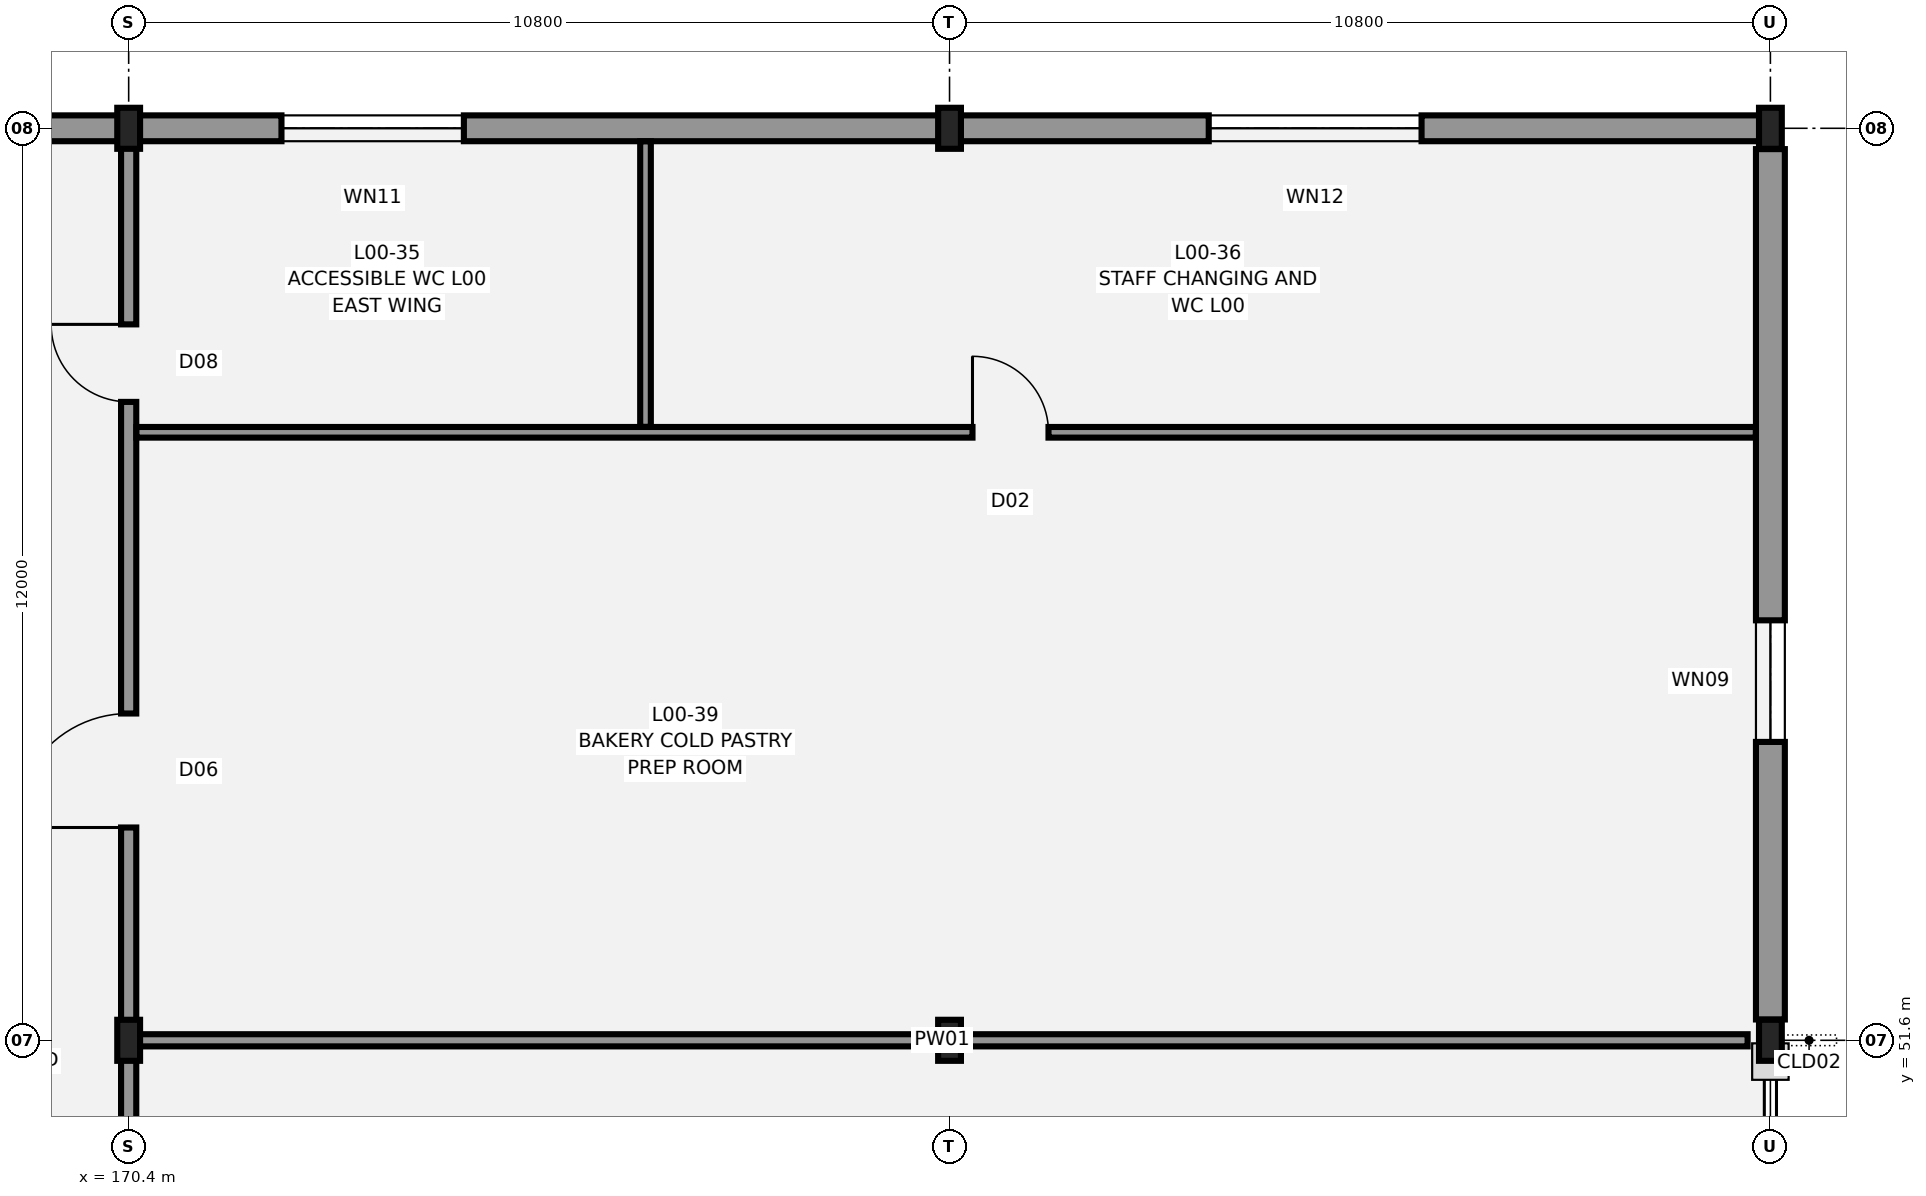
"""IFC4 building model, lengths in metres.
Left out: names, types, materials, properties, quantities, classifications, styles, units other than length and angle.
Written with IfcOpenShell. Run it as: python <this file> out.ifc"""

import sys

from ifc_helpers import new_model, si_unit, direction, frame, frame_2d, origin, origin_2d, place, context, subcontext, project, spatial, rectangle, i_section, extrude, element, fill, save


model = new_model("IFC4")
c1 = context("Model", 3, precision=1e-05, world=origin(), true_north=direction((0.0, 1.0)))
c2 = subcontext(c1, "Body", "Model", "MODEL_VIEW")
j1 = project(units=[si_unit("LENGTHUNIT", "METRE"), si_unit("PLANEANGLEUNIT", "RADIAN")], contexts=[c1])
p1 = place(None, origin())
s1 = spatial("IfcSite", under=j1, at=p1, CompositionType="ELEMENT")
p2 = place(p1, origin())
s2 = spatial("IfcBuilding", under=s1, at=p2, CompositionType="ELEMENT")
p3 = place(p2, origin())
s3 = spatial("IfcBuildingStorey", under=s2, at=p3, CompositionType="ELEMENT", Elevation=0.0)
for number, where, z_axis, x_axis in (
    (1, (170.4, 51.6, 0.0), (0.0, 0.0, 1.0), (1.0, 0.0, 0.0)),
    (2, (170.4, 63.6, 0.0), (0.0, 0.0, 1.0), (1.0, 0.0, 0.0)),
    (3, (181.2, 51.6, 0.0), (0.0, 0.0, 1.0), (1.0, 0.0, 0.0)),
    (4, (181.2, 63.6, 0.0), (0.0, 0.0, 1.0), (1.0, 0.0, 0.0)),
    (5, (192.0, 51.6, 0.0), (0.0, 0.0, 1.0), (1.0, 0.0, 0.0)),
    (6, (192.0, 63.6, 0.0), (0.0, 0.0, 1.0), (1.0, 0.0, 0.0)),
):
    element("IfcColumn", number, at=place(p3, frame(where, z_axis=z_axis, x_axis=x_axis)), inside=s3, PredefinedType="COLUMN", context=c2, shape_type="SweptSolid", body=[
        extrude(i_section(OverallWidth=0.3, OverallDepth=0.54, WebThickness=0.012, FlangeThickness=0.024, FilletRadius=0.027, at=origin_2d()), origin(), (0.0, 0.0, 1.0), 5.4),
    ])
p4 = place(p3, frame((192.0, 63.326, 0.0), z_axis=(0.0, 0.0, 1.0), x_axis=(0.0, -1.0, 0.0)))
e7 = element("IfcWall", 7, at=p4, inside=s3, PredefinedType="STANDARD", context=c2, shape_type="SweptSolid", body=[
    extrude(rectangle(XDim=11.452, YDim=0.38, at=frame_2d((5.726, 0.0))), origin(), (0.0, 0.0, 1.0), 4.765),
])
p5 = place(p4, frame((6.2, 0.0, 0.8)))
e8 = element("IfcOpeningElement", 8, at=p5, cuts=e7, PredefinedType="OPENING", context=c2, shape_type="SweptSolid", body=[
    extrude(rectangle(XDim=1.6, YDim=2.0, at=frame_2d((0.8, 1.0))), frame((0.0, 0.2, 0.0), z_axis=(0.0, -1.0, 0.0), x_axis=(1.0, 0.0, 0.0)), (0.0, 0.0, 1.0), 0.4),
])
p6 = place(p3, frame((159.61, 63.6, 0.0), z_axis=(0.0, 0.0, 1.0), x_axis=(1.0, 0.0, 0.0)))
e9 = element("IfcWall", 9, at=p6, inside=s3, PredefinedType="STANDARD", context=c2, shape_type="SweptSolid", body=[
    extrude(rectangle(XDim=10.779, YDim=0.34, at=frame_2d((5.39, 0.0))), origin(), (0.0, 0.0, 1.0), 4.665),
])
p7 = place(p6, frame((3.6, 0.0, 0.0)))
e10 = element("IfcOpeningElement", 10, at=p7, cuts=e9, PredefinedType="OPENING", context=c2, shape_type="SweptSolid", body=[
    extrude(rectangle(XDim=2.0, YDim=2.3, at=frame_2d((1.0, 1.15))), frame((0.0, 0.18, 0.0), z_axis=(0.0, -1.0, 0.0), x_axis=(1.0, 0.0, 0.0)), (0.0, 0.0, 1.0), 0.36),
])
p8 = place(p3, frame((170.41, 63.6, 0.0), z_axis=(0.0, 0.0, 1.0), x_axis=(1.0, 0.0, 0.0)))
e11 = element("IfcWall", 11, at=p8, inside=s3, PredefinedType="STANDARD", context=c2, shape_type="SweptSolid", body=[
    extrude(rectangle(XDim=10.779, YDim=0.34, at=frame_2d((5.39, 0.0))), origin(), (0.0, 0.0, 1.0), 4.665),
])
p9 = place(p8, frame((2.0, 0.0, 0.8)))
e12 = element("IfcOpeningElement", 12, at=p9, cuts=e11, PredefinedType="OPENING", context=c2, shape_type="SweptSolid", body=[
    extrude(rectangle(XDim=2.4, YDim=2.1, at=frame_2d((1.2, 1.05))), frame((0.0, 0.18, 0.0), z_axis=(0.0, -1.0, 0.0), x_axis=(1.0, 0.0, 0.0)), (0.0, 0.0, 1.0), 0.36),
])
p10 = place(p3, frame((181.21, 63.6, 0.0), z_axis=(0.0, 0.0, 1.0), x_axis=(1.0, 0.0, 0.0)))
e13 = element("IfcWall", 13, at=p10, inside=s3, PredefinedType="STANDARD", context=c2, shape_type="SweptSolid", body=[
    extrude(rectangle(XDim=10.78, YDim=0.34, at=frame_2d((5.39, 0.0))), origin(), (0.0, 0.0, 1.0), 4.665),
])
p11 = place(p10, frame((3.4, 0.0, 0.8)))
e14 = element("IfcOpeningElement", 14, at=p11, cuts=e13, PredefinedType="OPENING", context=c2, shape_type="SweptSolid", body=[
    extrude(rectangle(XDim=2.8, YDim=2.1, at=frame_2d((1.4, 1.05))), frame((0.0, 0.18, 0.0), z_axis=(0.0, -1.0, 0.0), x_axis=(1.0, 0.0, 0.0)), (0.0, 0.0, 1.0), 0.36),
])
p12 = place(p3, frame((170.4, 6.8, 0.0), z_axis=(0.0, 0.0, 1.0), x_axis=(0.0, 1.0, 0.0)))
e15 = element("IfcWall", 15, at=p12, inside=s3, PredefinedType="PARTITIONING", context=c2, shape_type="SweptSolid", body=[
    extrude(rectangle(XDim=56.628, YDim=0.2, at=frame_2d((28.314, 0.0))), origin(), (0.0, 0.0, 1.0), 4.765),
])
p13 = place(p12, frame((3.2, 0.0, 0.0)))
e16 = element("IfcOpeningElement", 16, at=p13, cuts=e15, PredefinedType="OPENING", context=c2, shape_type="SweptSolid", body=[
    extrude(rectangle(XDim=1.22, YDim=2.15, at=frame_2d((0.61, 1.075))), frame((0.0, 0.11, 0.0), z_axis=(0.0, -1.0, 0.0), x_axis=(1.0, 0.0, 0.0)), (0.0, 0.0, 1.0), 0.22),
])
p14 = place(p12, frame((13.0, 0.0, 0.0)))
e17 = element("IfcOpeningElement", 17, at=p14, cuts=e15, PredefinedType="OPENING", context=c2, shape_type="SweptSolid", body=[
    extrude(rectangle(XDim=1.6, YDim=2.2, at=frame_2d((0.8, 1.1))), frame((0.0, 0.11, 0.0), z_axis=(0.0, -1.0, 0.0), x_axis=(1.0, 0.0, 0.0)), (0.0, 0.0, 1.0), 0.22),
])
p15 = place(p12, frame((26.0, 0.0, 0.0)))
e18 = element("IfcOpeningElement", 18, at=p15, cuts=e15, PredefinedType="OPENING", context=c2, shape_type="SweptSolid", body=[
    extrude(rectangle(XDim=1.5, YDim=2.15, at=frame_2d((0.75, 1.075))), frame((0.0, 0.11, 0.0), z_axis=(0.0, -1.0, 0.0), x_axis=(1.0, 0.0, 0.0)), (0.0, 0.0, 1.0), 0.22),
])
p16 = place(p12, frame((47.6, 0.0, 0.0)))
e19 = element("IfcOpeningElement", 19, at=p16, cuts=e15, PredefinedType="OPENING", context=c2, shape_type="SweptSolid", body=[
    extrude(rectangle(XDim=1.5, YDim=2.15, at=frame_2d((0.75, 1.075))), frame((0.0, 0.11, 0.0), z_axis=(0.0, -1.0, 0.0), x_axis=(1.0, 0.0, 0.0)), (0.0, 0.0, 1.0), 0.22),
])
p17 = place(p12, frame((53.2, 0.0, 0.0)))
e20 = element("IfcOpeningElement", 20, at=p17, cuts=e15, PredefinedType="OPENING", context=c2, shape_type="SweptSolid", body=[
    extrude(rectangle(XDim=1.02, YDim=2.12, at=frame_2d((0.51, 1.06))), frame((0.0, 0.11, 0.0), z_axis=(0.0, -1.0, 0.0), x_axis=(1.0, 0.0, 0.0)), (0.0, 0.0, 1.0), 0.22),
])
p18 = place(p12, frame((4.733, 0.0, 1.05)))
e21 = element("IfcOpeningElement", 21, at=p18, cuts=e15, PredefinedType="OPENING", context=c2, shape_type="SweptSolid", body=[
    extrude(rectangle(XDim=2.8, YDim=1.3, at=frame_2d((1.4, 0.65))), frame((0.0, 0.11, 0.0), z_axis=(0.0, -1.0, 0.0), x_axis=(1.0, 0.0, 0.0)), (0.0, 0.0, 1.0), 0.22),
])
p19 = place(p3, frame((170.502, 51.6, 0.0), z_axis=(0.0, 0.0, 1.0), x_axis=(1.0, 0.0, 0.0)))
e22 = element("IfcWall", 22, at=p19, inside=s3, PredefinedType="PARTITIONING", context=c2, shape_type="SweptSolid", body=[
    extrude(rectangle(XDim=21.198, YDim=0.16, at=frame_2d((10.599, 0.0))), origin(), (0.0, 0.0, 1.0), 4.665),
])
p20 = place(p3, frame((170.502, 59.6, 0.0), z_axis=(0.0, 0.0, 1.0), x_axis=(1.0, 0.0, 0.0)))
e23 = element("IfcWall", 23, at=p20, inside=s3, PredefinedType="PARTITIONING", context=c2, shape_type="SweptSolid", body=[
    extrude(rectangle(XDim=21.306, YDim=0.14, at=frame_2d((10.653, 0.0))), origin(), (0.0, 0.0, 1.0), 4.715),
])
p21 = place(p20, frame((11.0, 0.0, 0.0)))
e24 = element("IfcOpeningElement", 24, at=p21, cuts=e23, PredefinedType="OPENING", context=c2, shape_type="SweptSolid", body=[
    extrude(rectangle(XDim=1.0, YDim=2.1, at=frame_2d((0.5, 1.05))), frame((0.0, 0.08, 0.0), z_axis=(0.0, -1.0, 0.0), x_axis=(1.0, 0.0, 0.0)), (0.0, 0.0, 1.0), 0.16),
])
p22 = place(p3, frame((177.2, 59.672, 0.0), z_axis=(0.0, 0.0, 1.0), x_axis=(0.0, 1.0, 0.0)))
e25 = element("IfcWall", 25, at=p22, inside=s3, PredefinedType="PARTITIONING", context=c2, shape_type="SweptSolid", body=[
    extrude(rectangle(XDim=3.756, YDim=0.14, at=frame_2d((1.878, 0.0))), origin(), (0.0, 0.0, 1.0), 5.04),
])
p23 = place(p5, origin())
e26 = element("IfcWindow", 26, at=p23, inside=s3, PartitioningType="SINGLE_PANEL", PredefinedType="WINDOW", context=c2, shape_type="SweptSolid", body=[
    extrude(rectangle(XDim=1.6, YDim=2.0, at=frame_2d((0.8, 1.0))), frame((0.0, 0.03, 0.0), z_axis=(0.0, -1.0, 0.0), x_axis=(1.0, 0.0, 0.0)), (0.0, 0.0, 1.0), 0.06),
])
fill(e8, e26)
p24 = place(p9, origin())
e27 = element("IfcWindow", 27, at=p24, inside=s3, PartitioningType="SINGLE_PANEL", PredefinedType="WINDOW", context=c2, shape_type="SweptSolid", body=[
    extrude(rectangle(XDim=2.4, YDim=2.1, at=frame_2d((1.2, 1.05))), frame((0.0, 0.03, 0.0), z_axis=(0.0, -1.0, 0.0), x_axis=(1.0, 0.0, 0.0)), (0.0, 0.0, 1.0), 0.06),
])
fill(e12, e27)
p25 = place(p11, origin())
e28 = element("IfcWindow", 28, at=p25, inside=s3, PartitioningType="SINGLE_PANEL", PredefinedType="WINDOW", context=c2, shape_type="SweptSolid", body=[
    extrude(rectangle(XDim=2.8, YDim=2.1, at=frame_2d((1.4, 1.05))), frame((0.0, 0.03, 0.0), z_axis=(0.0, -1.0, 0.0), x_axis=(1.0, 0.0, 0.0)), (0.0, 0.0, 1.0), 0.06),
])
fill(e14, e28)
p26 = place(p16, origin())
e29 = element("IfcDoor", 29, at=p26, inside=s3, OperationType="SINGLE_SWING_LEFT", PredefinedType="DOOR", context=c2, shape_type="SweptSolid", body=[
    extrude(rectangle(XDim=1.5, YDim=2.15, at=frame_2d((0.75, 1.075))), frame((0.0, 0.025, 0.0), z_axis=(0.0, -1.0, 0.0), x_axis=(1.0, 0.0, 0.0)), (0.0, 0.0, 1.0), 0.05),
])
fill(e19, e29)
p27 = place(p17, origin())
e30 = element("IfcDoor", 30, at=p27, inside=s3, OperationType="SINGLE_SWING_RIGHT", PredefinedType="DOOR", context=c2, shape_type="SweptSolid", body=[
    extrude(rectangle(XDim=1.02, YDim=2.12, at=frame_2d((0.51, 1.06))), frame((0.0, 0.025, 0.0), z_axis=(0.0, -1.0, 0.0), x_axis=(1.0, 0.0, 0.0)), (0.0, 0.0, 1.0), 0.05),
])
fill(e20, e30)
p28 = place(p21, origin())
e31 = element("IfcDoor", 31, at=p28, inside=s3, OperationType="SINGLE_SWING_LEFT", PredefinedType="DOOR", context=c2, shape_type="SweptSolid", body=[
    extrude(rectangle(XDim=1.0, YDim=2.1, at=frame_2d((0.5, 1.05))), frame((0.0, 0.025, 0.0), z_axis=(0.0, -1.0, 0.0), x_axis=(1.0, 0.0, 0.0)), (0.0, 0.0, 1.0), 0.05),
])
fill(e24, e31)
save(model, sys.argv[1])
